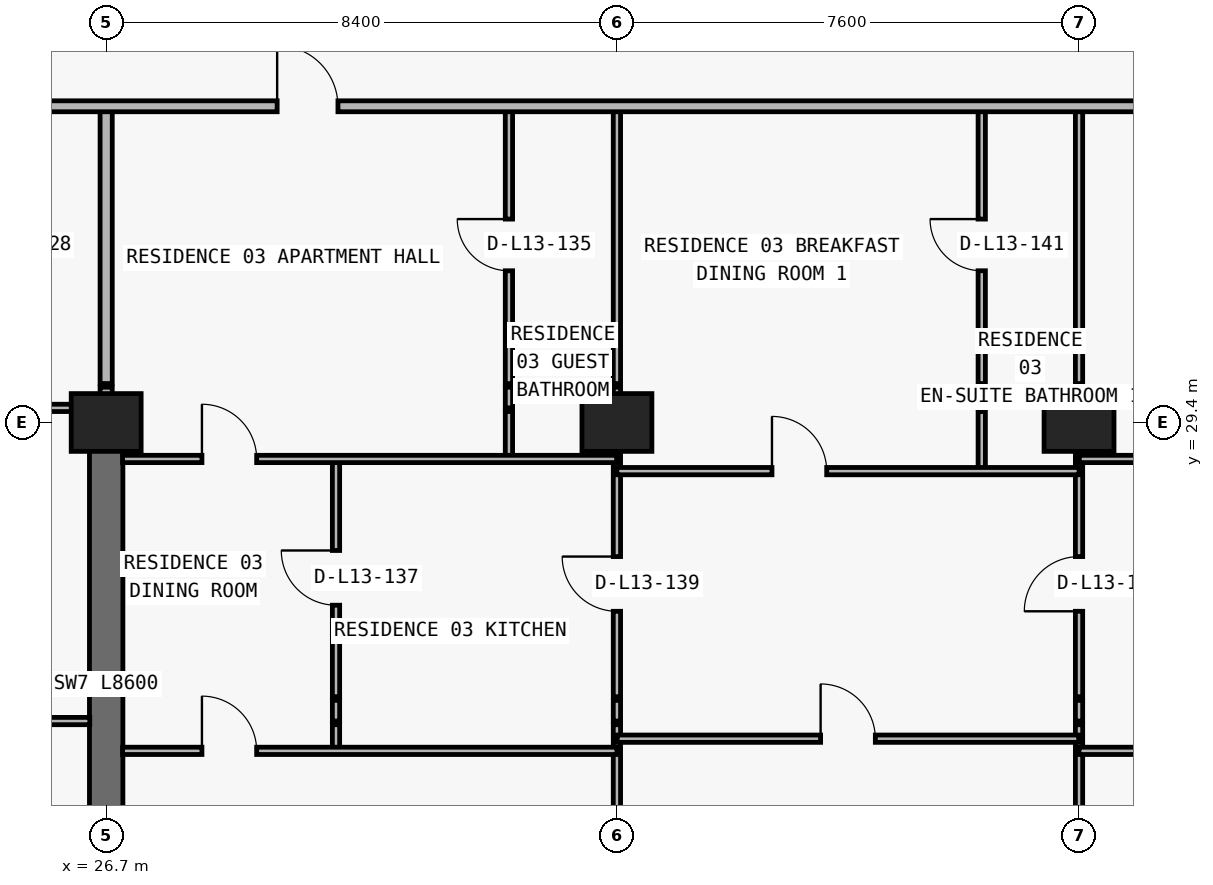
"""IFC4 building model, lengths in metres.
Left out: names, types, materials, properties, quantities, classifications, styles, units other than length and angle.
Written with IfcOpenShell. Run it as: python <this file> out.ifc"""

import sys

from ifc_helpers import new_model, si_unit, direction, frame, frame_2d, origin, origin_2d, place, context, subcontext, project, spatial, rectangle, extrude, element, fill, save


model = new_model("IFC4")
c1 = context("Model", 3, precision=1e-05, world=origin(), true_north=direction((0.0, 1.0)))
c2 = subcontext(c1, "Body", "Model", "MODEL_VIEW")
j1 = project(units=[si_unit("LENGTHUNIT", "METRE"), si_unit("PLANEANGLEUNIT", "RADIAN")], contexts=[c1])
p1 = place(None, origin())
s1 = spatial("IfcSite", under=j1, at=p1, CompositionType="ELEMENT")
p2 = place(p1, origin())
s2 = spatial("IfcBuilding", under=s1, at=p2, CompositionType="ELEMENT")
p3 = place(p2, frame((0.0, 0.0, 53.1)))
s3 = spatial("IfcBuildingStorey", under=s2, at=p3, CompositionType="ELEMENT", Elevation=53.1)
for number, where, z_axis, x_axis in (
    (1, (26.7, 29.4, 0.0), (0.0, 0.0, 1.0), (1.0, 0.0, 0.0)),
    (2, (35.1, 29.4, 0.0), (0.0, 0.0, 1.0), (1.0, 0.0, 0.0)),
    (3, (42.7, 29.4, 0.0), (0.0, 0.0, 1.0), (1.0, 0.0, 0.0)),
):
    element("IfcColumn", number, at=place(p3, frame(where, z_axis=z_axis, x_axis=x_axis)), inside=s3, PredefinedType="COLUMN", context=c2, shape_type="SweptSolid", body=[
        extrude(rectangle(XDim=1.15, YDim=0.95, at=origin_2d()), origin(), (0.0, 0.0, 1.0), 3.05),
    ])
p4 = place(p3, frame((26.7, 20.8, 0.0), z_axis=(0.0, 0.0, 1.0), x_axis=(0.0, 1.0, 0.0)))
e4 = element("IfcWall", 4, at=p4, inside=s3, PredefinedType="SHEAR", context=c2, shape_type="SweptSolid", body=[
    extrude(rectangle(XDim=8.6, YDim=0.55, at=frame_2d((4.3, 0.0))), origin(), (0.0, 0.0, 1.0), 3.05),
])
p5 = place(p3, frame((26.7, 29.64, 0.0), z_axis=(0.0, 0.0, 1.0), x_axis=(0.0, 1.0, 0.0)))
e5 = element("IfcWall", 5, at=p5, inside=s3, PredefinedType="PARTITIONING", context=c2, shape_type="SweptSolid", body=[
    extrude(rectangle(XDim=0.34, YDim=0.2, at=frame_2d((0.17, 0.0))), origin(), (0.0, 0.0, 1.0), 2.335),
])
p6 = place(p3, frame((26.7, 30.04, 0.0), z_axis=(0.0, 0.0, 1.0), x_axis=(0.0, 1.0, 0.0)))
e6 = element("IfcWall", 6, at=p6, inside=s3, PredefinedType="PARTITIONING", context=c2, shape_type="SweptSolid", body=[
    extrude(rectangle(XDim=4.56, YDim=0.2, at=frame_2d((2.28, 0.0))), origin(), (0.0, 0.0, 1.0), 2.335),
])
p7 = place(p3, frame((30.48, 24.0, 0.0), z_axis=(0.0, 0.0, 1.0), x_axis=(0.0, 1.0, 0.0)))
e7 = element("IfcWall", 7, at=p7, inside=s3, PredefinedType="PARTITIONING", context=c2, shape_type="SweptSolid", body=[
    extrude(rectangle(XDim=0.43, YDim=0.12, at=frame_2d((0.215, 0.0))), origin(), (0.0, 0.0, 1.0), 3.05),
])
p8 = place(p3, frame((30.48, 24.49, 0.0), z_axis=(0.0, 0.0, 1.0), x_axis=(0.0, 1.0, 0.0)))
e8 = element("IfcWall", 8, at=p8, inside=s3, PredefinedType="PARTITIONING", context=c2, shape_type="SweptSolid", body=[
    extrude(rectangle(XDim=0.34, YDim=0.12, at=frame_2d((0.17, 0.0))), origin(), (0.0, 0.0, 1.0), 3.05),
])
p9 = place(p3, frame((30.48, 24.89, 0.0), z_axis=(0.0, 0.0, 1.0), x_axis=(0.0, 1.0, 0.0)))
e9 = element("IfcWall", 9, at=p9, inside=s3, PredefinedType="PARTITIONING", context=c2, shape_type="SweptSolid", body=[
    extrude(rectangle(XDim=3.91, YDim=0.12, at=frame_2d((1.955, 0.0))), origin(), (0.0, 0.0, 1.0), 3.05),
])
p10 = place(p9, frame((1.505, 0.0, 0.0)))
e10 = element("IfcOpeningElement", 10, at=p10, cuts=e9, PredefinedType="OPENING", context=c2, shape_type="SweptSolid", body=[
    extrude(rectangle(XDim=0.9, YDim=2.15, at=frame_2d((0.45, 1.075))), frame((0.0, 0.07, 0.0), z_axis=(0.0, -1.0, 0.0), x_axis=(1.0, 0.0, 0.0)), (0.0, 0.0, 1.0), 0.14),
])
p11 = place(p3, frame((33.324, 28.8, 0.0), z_axis=(0.0, 0.0, 1.0), x_axis=(0.0, 1.0, 0.0)))
e11 = element("IfcWall", 11, at=p11, inside=s3, PredefinedType="PARTITIONING", context=c2, shape_type="SweptSolid", body=[
    extrude(rectangle(XDim=0.78, YDim=0.12, at=frame_2d((0.39, 0.0))), origin(), (0.0, 0.0, 1.0), 3.05),
])
p12 = place(p3, frame((33.324, 29.64, 0.0), z_axis=(0.0, 0.0, 1.0), x_axis=(0.0, 1.0, 0.0)))
e12 = element("IfcWall", 12, at=p12, inside=s3, PredefinedType="PARTITIONING", context=c2, shape_type="SweptSolid", body=[
    extrude(rectangle(XDim=0.34, YDim=0.12, at=frame_2d((0.17, 0.0))), origin(), (0.0, 0.0, 1.0), 3.05),
])
p13 = place(p3, frame((33.324, 30.04, 0.0), z_axis=(0.0, 0.0, 1.0), x_axis=(0.0, 1.0, 0.0)))
e13 = element("IfcWall", 13, at=p13, inside=s3, PredefinedType="PARTITIONING", context=c2, shape_type="SweptSolid", body=[
    extrude(rectangle(XDim=4.56, YDim=0.12, at=frame_2d((2.28, 0.0))), origin(), (0.0, 0.0, 1.0), 3.05),
])
p14 = place(p13, frame((1.855, 0.0, 0.0)))
e14 = element("IfcOpeningElement", 14, at=p14, cuts=e13, PredefinedType="OPENING", context=c2, shape_type="SweptSolid", body=[
    extrude(rectangle(XDim=0.85, YDim=2.1, at=frame_2d((0.425, 1.05))), frame((0.0, 0.07, 0.0), z_axis=(0.0, -1.0, 0.0), x_axis=(1.0, 0.0, 0.0)), (0.0, 0.0, 1.0), 0.14),
])
p15 = place(p3, frame((35.1, 6.24, 0.0), z_axis=(0.0, 0.0, 1.0), x_axis=(0.0, 1.0, 0.0)))
e15 = element("IfcWall", 15, at=p15, inside=s3, PredefinedType="PARTITIONING", context=c2, shape_type="SweptSolid", body=[
    extrude(rectangle(XDim=18.19, YDim=0.12, at=frame_2d((9.095, 0.0))), origin(), (0.0, 0.0, 1.0), 2.11),
])
p16 = place(p3, frame((35.1, 24.49, 0.0), z_axis=(0.0, 0.0, 1.0), x_axis=(0.0, 1.0, 0.0)))
e16 = element("IfcWall", 16, at=p16, inside=s3, PredefinedType="PARTITIONING", context=c2, shape_type="SweptSolid", body=[
    extrude(rectangle(XDim=0.34, YDim=0.12, at=frame_2d((0.17, 0.0))), origin(), (0.0, 0.0, 1.0), 2.11),
])
p17 = place(p3, frame((35.1, 24.89, 0.0), z_axis=(0.0, 0.0, 1.0), x_axis=(0.0, 1.0, 0.0)))
e17 = element("IfcWall", 17, at=p17, inside=s3, PredefinedType="PARTITIONING", context=c2, shape_type="SweptSolid", body=[
    extrude(rectangle(XDim=4.69, YDim=0.12, at=frame_2d((2.345, 0.0))), origin(), (0.0, 0.0, 1.0), 2.11),
])
p18 = place(p17, frame((1.405, 0.0, 0.0)))
e18 = element("IfcOpeningElement", 18, at=p18, cuts=e17, PredefinedType="OPENING", context=c2, shape_type="SweptSolid", body=[
    extrude(rectangle(XDim=0.9, YDim=2.06, at=frame_2d((0.45, 1.03))), frame((0.0, 0.07, 0.0), z_axis=(0.0, -1.0, 0.0), x_axis=(1.0, 0.0, 0.0)), (0.0, 0.0, 1.0), 0.14),
])
p19 = place(p3, frame((35.1, 29.64, 0.0), z_axis=(0.0, 0.0, 1.0), x_axis=(0.0, 1.0, 0.0)))
e19 = element("IfcWall", 19, at=p19, inside=s3, PredefinedType="PARTITIONING", context=c2, shape_type="SweptSolid", body=[
    extrude(rectangle(XDim=0.34, YDim=0.12, at=frame_2d((0.17, 0.0))), origin(), (0.0, 0.0, 1.0), 2.11),
])
p20 = place(p3, frame((35.1, 30.04, 0.0), z_axis=(0.0, 0.0, 1.0), x_axis=(0.0, 1.0, 0.0)))
e20 = element("IfcWall", 20, at=p20, inside=s3, PredefinedType="PARTITIONING", context=c2, shape_type="SweptSolid", body=[
    extrude(rectangle(XDim=4.56, YDim=0.12, at=frame_2d((2.28, 0.0))), origin(), (0.0, 0.0, 1.0), 2.11),
])
p21 = place(p3, frame((41.1, 28.6, 0.0), z_axis=(0.0, 0.0, 1.0), x_axis=(0.0, 1.0, 0.0)))
e21 = element("IfcWall", 21, at=p21, inside=s3, PredefinedType="PARTITIONING", context=c2, shape_type="SweptSolid", body=[
    extrude(rectangle(XDim=0.98, YDim=0.12, at=frame_2d((0.49, 0.0))), origin(), (0.0, 0.0, 1.0), 2.578),
])
p22 = place(p3, frame((41.1, 29.64, 0.0), z_axis=(0.0, 0.0, 1.0), x_axis=(0.0, 1.0, 0.0)))
e22 = element("IfcWall", 22, at=p22, inside=s3, PredefinedType="PARTITIONING", context=c2, shape_type="SweptSolid", body=[
    extrude(rectangle(XDim=0.34, YDim=0.12, at=frame_2d((0.17, 0.0))), origin(), (0.0, 0.0, 1.0), 3.05),
])
p23 = place(p3, frame((41.1, 30.04, 0.0), z_axis=(0.0, 0.0, 1.0), x_axis=(0.0, 1.0, 0.0)))
e23 = element("IfcWall", 23, at=p23, inside=s3, PredefinedType="PARTITIONING", context=c2, shape_type="SweptSolid", body=[
    extrude(rectangle(XDim=4.56, YDim=0.12, at=frame_2d((2.28, 0.0))), origin(), (0.0, 0.0, 1.0), 3.05),
])
p24 = place(p23, frame((1.855, 0.0, 0.0)))
e24 = element("IfcOpeningElement", 24, at=p24, cuts=e23, PredefinedType="OPENING", context=c2, shape_type="SweptSolid", body=[
    extrude(rectangle(XDim=0.85, YDim=2.1, at=frame_2d((0.425, 1.05))), frame((0.0, 0.07, 0.0), z_axis=(0.0, -1.0, 0.0), x_axis=(1.0, 0.0, 0.0)), (0.0, 0.0, 1.0), 0.14),
])
p25 = place(p3, frame((42.7, 6.24, 0.0), z_axis=(0.0, 0.0, 1.0), x_axis=(0.0, 1.0, 0.0)))
e25 = element("IfcWall", 25, at=p25, inside=s3, PredefinedType="PARTITIONING", context=c2, shape_type="SweptSolid", body=[
    extrude(rectangle(XDim=18.19, YDim=0.12, at=frame_2d((9.095, 0.0))), origin(), (0.0, 0.0, 1.0), 2.11),
])
p26 = place(p3, frame((42.7, 24.49, 0.0), z_axis=(0.0, 0.0, 1.0), x_axis=(0.0, 1.0, 0.0)))
e26 = element("IfcWall", 26, at=p26, inside=s3, PredefinedType="PARTITIONING", context=c2, shape_type="SweptSolid", body=[
    extrude(rectangle(XDim=0.34, YDim=0.12, at=frame_2d((0.17, 0.0))), origin(), (0.0, 0.0, 1.0), 2.11),
])
p27 = place(p3, frame((42.7, 24.89, 0.0), z_axis=(0.0, 0.0, 1.0), x_axis=(0.0, 1.0, 0.0)))
e27 = element("IfcWall", 27, at=p27, inside=s3, PredefinedType="PARTITIONING", context=c2, shape_type="SweptSolid", body=[
    extrude(rectangle(XDim=4.69, YDim=0.12, at=frame_2d((2.345, 0.0))), origin(), (0.0, 0.0, 1.0), 2.11),
])
p28 = place(p27, frame((1.405, 0.0, 0.0)))
e28 = element("IfcOpeningElement", 28, at=p28, cuts=e27, PredefinedType="OPENING", context=c2, shape_type="SweptSolid", body=[
    extrude(rectangle(XDim=0.9, YDim=2.06, at=frame_2d((0.45, 1.03))), frame((0.0, 0.07, 0.0), z_axis=(0.0, -1.0, 0.0), x_axis=(1.0, 0.0, 0.0)), (0.0, 0.0, 1.0), 0.14),
])
p29 = place(p3, frame((42.7, 29.64, 0.0), z_axis=(0.0, 0.0, 1.0), x_axis=(0.0, 1.0, 0.0)))
e29 = element("IfcWall", 29, at=p29, inside=s3, PredefinedType="PARTITIONING", context=c2, shape_type="SweptSolid", body=[
    extrude(rectangle(XDim=0.34, YDim=0.12, at=frame_2d((0.17, 0.0))), origin(), (0.0, 0.0, 1.0), 2.11),
])
p30 = place(p3, frame((42.7, 30.04, 0.0), z_axis=(0.0, 0.0, 1.0), x_axis=(0.0, 1.0, 0.0)))
e30 = element("IfcWall", 30, at=p30, inside=s3, PredefinedType="PARTITIONING", context=c2, shape_type="SweptSolid", body=[
    extrude(rectangle(XDim=4.56, YDim=0.12, at=frame_2d((2.28, 0.0))), origin(), (0.0, 0.0, 1.0), 2.11),
])
p31 = place(p3, frame((26.97, 24.0, 0.0), z_axis=(0.0, 0.0, 1.0), x_axis=(1.0, 0.0, 0.0)))
e31 = element("IfcWall", 31, at=p31, inside=s3, PredefinedType="PARTITIONING", context=c2, shape_type="SweptSolid", body=[
    extrude(rectangle(XDim=8.13, YDim=0.12, at=frame_2d((4.065, 0.0))), origin(), (0.0, 0.0, 1.0), 3.05),
])
p32 = place(p31, frame((1.305, 0.0, 0.0)))
e32 = element("IfcOpeningElement", 32, at=p32, cuts=e31, PredefinedType="OPENING", context=c2, shape_type="SweptSolid", body=[
    extrude(rectangle(XDim=0.9, YDim=2.15, at=frame_2d((0.45, 1.075))), frame((0.0, 0.07, 0.0), z_axis=(0.0, -1.0, 0.0), x_axis=(1.0, 0.0, 0.0)), (0.0, 0.0, 1.0), 0.14),
])
p33 = place(p3, frame((42.7, 24.0, 0.0), z_axis=(0.0, 0.0, 1.0), x_axis=(1.0, 0.0, 0.0)))
e33 = element("IfcWall", 33, at=p33, inside=s3, PredefinedType="PARTITIONING", context=c2, shape_type="SweptSolid", body=[
    extrude(rectangle(XDim=8.13, YDim=0.12, at=frame_2d((4.065, 0.0))), origin(), (0.0, 0.0, 1.0), 3.05),
])
p34 = place(p33, frame((3.615, 0.0, 0.0)))
e34 = element("IfcOpeningElement", 34, at=p34, cuts=e33, PredefinedType="OPENING", context=c2, shape_type="SweptSolid", body=[
    extrude(rectangle(XDim=0.9, YDim=2.15, at=frame_2d((0.45, 1.075))), frame((0.0, 0.07, 0.0), z_axis=(0.0, -1.0, 0.0), x_axis=(1.0, 0.0, 0.0)), (0.0, 0.0, 1.0), 0.14),
])
p35 = place(p3, frame((35.105, 24.2, 0.0), z_axis=(0.0, 0.0, 1.0), x_axis=(1.0, 0.0, 0.0)))
e35 = element("IfcWall", 35, at=p35, inside=s3, PredefinedType="PARTITIONING", context=c2, shape_type="SweptSolid", body=[
    extrude(rectangle(XDim=7.59, YDim=0.12, at=frame_2d((3.795, 0.0))), origin(), (0.0, 0.0, 1.0), 3.05),
])
p36 = place(p35, frame((3.345, 0.0, 0.0)))
e36 = element("IfcOpeningElement", 36, at=p36, cuts=e35, PredefinedType="OPENING", context=c2, shape_type="SweptSolid", body=[
    extrude(rectangle(XDim=0.9, YDim=2.15, at=frame_2d((0.45, 1.075))), frame((0.0, 0.07, 0.0), z_axis=(0.0, -1.0, 0.0), x_axis=(1.0, 0.0, 0.0)), (0.0, 0.0, 1.0), 0.14),
])
p37 = place(p3, frame((18.3, 24.49, 0.0), z_axis=(0.0, 0.0, 1.0), x_axis=(1.0, 0.0, 0.0)))
e37 = element("IfcWall", 37, at=p37, inside=s3, PredefinedType="PARTITIONING", context=c2, shape_type="SweptSolid", body=[
    extrude(rectangle(XDim=8.13, YDim=0.12, at=frame_2d((4.065, 0.0))), origin(), (0.0, 0.0, 1.0), 3.05),
])
p38 = place(p37, frame((1.818, 0.0, 0.0)))
e38 = element("IfcOpeningElement", 38, at=p38, cuts=e37, PredefinedType="OPENING", context=c2, shape_type="SweptSolid", body=[
    extrude(rectangle(XDim=0.9, YDim=2.15, at=frame_2d((0.45, 1.075))), frame((0.0, 0.07, 0.0), z_axis=(0.0, -1.0, 0.0), x_axis=(1.0, 0.0, 0.0)), (0.0, 0.0, 1.0), 0.14),
])
p39 = place(p37, frame((5.925, 0.0, 0.0)))
e39 = element("IfcOpeningElement", 39, at=p39, cuts=e37, PredefinedType="OPENING", context=c2, shape_type="SweptSolid", body=[
    extrude(rectangle(XDim=0.9, YDim=2.15, at=frame_2d((0.45, 1.075))), frame((0.0, 0.07, 0.0), z_axis=(0.0, -1.0, 0.0), x_axis=(1.0, 0.0, 0.0)), (0.0, 0.0, 1.0), 0.14),
])
p40 = place(p3, frame((35.1, 28.6, 0.0), z_axis=(0.0, 0.0, 1.0), x_axis=(1.0, 0.0, 0.0)))
e40 = element("IfcWall", 40, at=p40, inside=s3, PredefinedType="PARTITIONING", context=c2, shape_type="SweptSolid", body=[
    extrude(rectangle(XDim=7.6, YDim=0.12, at=frame_2d((3.8, 0.0))), origin(), (0.0, 0.0, 1.0), 3.05),
])
p41 = place(p40, frame((2.55, 0.0, 0.0)))
e41 = element("IfcOpeningElement", 41, at=p41, cuts=e40, PredefinedType="OPENING", context=c2, shape_type="SweptSolid", body=[
    extrude(rectangle(XDim=0.9, YDim=2.15, at=frame_2d((0.45, 1.075))), frame((0.0, 0.07, 0.0), z_axis=(0.0, -1.0, 0.0), x_axis=(1.0, 0.0, 0.0)), (0.0, 0.0, 1.0), 0.14),
])
p42 = place(p3, frame((26.97, 28.8, 0.0), z_axis=(0.0, 0.0, 1.0), x_axis=(1.0, 0.0, 0.0)))
e42 = element("IfcWall", 42, at=p42, inside=s3, PredefinedType="PARTITIONING", context=c2, shape_type="SweptSolid", body=[
    extrude(rectangle(XDim=8.125, YDim=0.12, at=frame_2d((4.062, 0.0))), origin(), (0.0, 0.0, 1.0), 3.05),
])
p43 = place(p42, frame((1.305, 0.0, 0.0)))
e43 = element("IfcOpeningElement", 43, at=p43, cuts=e42, PredefinedType="OPENING", context=c2, shape_type="SweptSolid", body=[
    extrude(rectangle(XDim=0.9, YDim=2.15, at=frame_2d((0.45, 1.075))), frame((0.0, 0.07, 0.0), z_axis=(0.0, -1.0, 0.0), x_axis=(1.0, 0.0, 0.0)), (0.0, 0.0, 1.0), 0.14),
])
p44 = place(p3, frame((42.705, 28.8, 0.0), z_axis=(0.0, 0.0, 1.0), x_axis=(1.0, 0.0, 0.0)))
e44 = element("IfcWall", 44, at=p44, inside=s3, PredefinedType="PARTITIONING", context=c2, shape_type="SweptSolid", body=[
    extrude(rectangle(XDim=8.125, YDim=0.12, at=frame_2d((4.062, 0.0))), origin(), (0.0, 0.0, 1.0), 3.05),
])
p45 = place(p44, frame((2.877, 0.0, 0.0)))
e45 = element("IfcOpeningElement", 45, at=p45, cuts=e44, PredefinedType="OPENING", context=c2, shape_type="SweptSolid", body=[
    extrude(rectangle(XDim=0.9, YDim=2.15, at=frame_2d((0.45, 1.075))), frame((0.0, 0.07, 0.0), z_axis=(0.0, -1.0, 0.0), x_axis=(1.0, 0.0, 0.0)), (0.0, 0.0, 1.0), 0.14),
])
p46 = place(p3, frame((18.3, 29.64, 0.0), z_axis=(0.0, 0.0, 1.0), x_axis=(1.0, 0.0, 0.0)))
e46 = element("IfcWall", 46, at=p46, inside=s3, PredefinedType="PARTITIONING", context=c2, shape_type="SweptSolid", body=[
    extrude(rectangle(XDim=8.4, YDim=0.12, at=frame_2d((4.2, 0.0))), origin(), (0.0, 0.0, 1.0), 2.11),
])
p47 = place(p46, frame((1.818, 0.0, 0.0)))
e47 = element("IfcOpeningElement", 47, at=p47, cuts=e46, PredefinedType="OPENING", context=c2, shape_type="SweptSolid", body=[
    extrude(rectangle(XDim=0.9, YDim=2.06, at=frame_2d((0.45, 1.03))), frame((0.0, 0.07, 0.0), z_axis=(0.0, -1.0, 0.0), x_axis=(1.0, 0.0, 0.0)), (0.0, 0.0, 1.0), 0.14),
])
p48 = place(p3, frame((5.105, 34.6, 0.0), z_axis=(0.0, 0.0, 1.0), x_axis=(1.0, 0.0, 0.0)))
e48 = element("IfcWall", 48, at=p48, inside=s3, PredefinedType="PARTITIONING", context=c2, shape_type="SweptSolid", body=[
    extrude(rectangle(XDim=67.595, YDim=0.18, at=frame_2d((33.797, 0.0))), origin(), (0.0, 0.0, 1.0), 3.05),
])
p49 = place(p48, frame((7.365, 0.0, 0.0)))
e49 = element("IfcOpeningElement", 49, at=p49, cuts=e48, PredefinedType="OPENING", context=c2, shape_type="SweptSolid", body=[
    extrude(rectangle(XDim=1.0, YDim=2.2, at=frame_2d((0.5, 1.1))), frame((0.0, 0.1, 0.0), z_axis=(0.0, -1.0, 0.0), x_axis=(1.0, 0.0, 0.0)), (0.0, 0.0, 1.0), 0.2),
])
p50 = place(p48, frame((15.927, 0.0, 0.0)))
e50 = element("IfcOpeningElement", 50, at=p50, cuts=e48, PredefinedType="OPENING", context=c2, shape_type="SweptSolid", body=[
    extrude(rectangle(XDim=1.0, YDim=2.2, at=frame_2d((0.5, 1.1))), frame((0.0, 0.1, 0.0), z_axis=(0.0, -1.0, 0.0), x_axis=(1.0, 0.0, 0.0)), (0.0, 0.0, 1.0), 0.2),
])
p51 = place(p48, frame((24.407, 0.0, 0.0)))
e51 = element("IfcOpeningElement", 51, at=p51, cuts=e48, PredefinedType="OPENING", context=c2, shape_type="SweptSolid", body=[
    extrude(rectangle(XDim=1.0, YDim=2.2, at=frame_2d((0.5, 1.1))), frame((0.0, 0.1, 0.0), z_axis=(0.0, -1.0, 0.0), x_axis=(1.0, 0.0, 0.0)), (0.0, 0.0, 1.0), 0.2),
])
p52 = place(p48, frame((48.739, 0.0, 0.0)))
e52 = element("IfcOpeningElement", 52, at=p52, cuts=e48, PredefinedType="OPENING", context=c2, shape_type="SweptSolid", body=[
    extrude(rectangle(XDim=1.0, YDim=2.2, at=frame_2d((0.5, 1.1))), frame((0.0, 0.1, 0.0), z_axis=(0.0, -1.0, 0.0), x_axis=(1.0, 0.0, 0.0)), (0.0, 0.0, 1.0), 0.2),
])
p53 = place(p48, frame((56.98, 0.0, 0.0)))
e53 = element("IfcOpeningElement", 53, at=p53, cuts=e48, PredefinedType="OPENING", context=c2, shape_type="SweptSolid", body=[
    extrude(rectangle(XDim=1.0, YDim=2.2, at=frame_2d((0.5, 1.1))), frame((0.0, 0.1, 0.0), z_axis=(0.0, -1.0, 0.0), x_axis=(1.0, 0.0, 0.0)), (0.0, 0.0, 1.0), 0.2),
])
p54 = place(p51, origin())
e54 = element("IfcDoor", 54, at=p54, inside=s3, OperationType="SINGLE_SWING_LEFT", PredefinedType="DOOR", context=c2, shape_type="SweptSolid", body=[
    extrude(rectangle(XDim=1.0, YDim=2.2, at=frame_2d((0.5, 1.1))), frame((0.0, 0.025, 0.0), z_axis=(0.0, -1.0, 0.0), x_axis=(1.0, 0.0, 0.0)), (0.0, 0.0, 1.0), 0.05),
])
fill(e51, e54)
p55 = place(p14, origin())
e55 = element("IfcDoor", 55, at=p55, inside=s3, OperationType="SINGLE_SWING_RIGHT", PredefinedType="DOOR", context=c2, shape_type="SweptSolid", body=[
    extrude(rectangle(XDim=0.85, YDim=2.1, at=frame_2d((0.425, 1.05))), frame((0.0, 0.025, 0.0), z_axis=(0.0, -1.0, 0.0), x_axis=(1.0, 0.0, 0.0)), (0.0, 0.0, 1.0), 0.05),
])
fill(e14, e55)
p56 = place(p43, origin())
e56 = element("IfcDoor", 56, at=p56, inside=s3, OperationType="SINGLE_SWING_LEFT", PredefinedType="DOOR", context=c2, shape_type="SweptSolid", body=[
    extrude(rectangle(XDim=0.9, YDim=2.15, at=frame_2d((0.45, 1.075))), frame((0.0, 0.025, 0.0), z_axis=(0.0, -1.0, 0.0), x_axis=(1.0, 0.0, 0.0)), (0.0, 0.0, 1.0), 0.05),
])
fill(e43, e56)
p57 = place(p10, origin())
e57 = element("IfcDoor", 57, at=p57, inside=s3, OperationType="SINGLE_SWING_RIGHT", PredefinedType="DOOR", context=c2, shape_type="SweptSolid", body=[
    extrude(rectangle(XDim=0.9, YDim=2.15, at=frame_2d((0.45, 1.075))), frame((0.0, 0.025, 0.0), z_axis=(0.0, -1.0, 0.0), x_axis=(1.0, 0.0, 0.0)), (0.0, 0.0, 1.0), 0.05),
])
fill(e10, e57)
p58 = place(p32, origin())
e58 = element("IfcDoor", 58, at=p58, inside=s3, OperationType="SINGLE_SWING_LEFT", PredefinedType="DOOR", context=c2, shape_type="SweptSolid", body=[
    extrude(rectangle(XDim=0.9, YDim=2.15, at=frame_2d((0.45, 1.075))), frame((0.0, 0.025, 0.0), z_axis=(0.0, -1.0, 0.0), x_axis=(1.0, 0.0, 0.0)), (0.0, 0.0, 1.0), 0.05),
])
fill(e32, e58)
p59 = place(p18, origin())
e59 = element("IfcDoor", 59, at=p59, inside=s3, OperationType="SINGLE_SWING_RIGHT", PredefinedType="DOOR", context=c2, shape_type="SweptSolid", body=[
    extrude(rectangle(XDim=0.9, YDim=2.06, at=frame_2d((0.45, 1.03))), frame((0.0, 0.025, 0.0), z_axis=(0.0, -1.0, 0.0), x_axis=(1.0, 0.0, 0.0)), (0.0, 0.0, 1.0), 0.05),
])
fill(e18, e59)
p60 = place(p41, origin())
e60 = element("IfcDoor", 60, at=p60, inside=s3, OperationType="SINGLE_SWING_LEFT", PredefinedType="DOOR", context=c2, shape_type="SweptSolid", body=[
    extrude(rectangle(XDim=0.9, YDim=2.15, at=frame_2d((0.45, 1.075))), frame((0.0, 0.025, 0.0), z_axis=(0.0, -1.0, 0.0), x_axis=(1.0, 0.0, 0.0)), (0.0, 0.0, 1.0), 0.05),
])
fill(e41, e60)
p61 = place(p24, origin())
e61 = element("IfcDoor", 61, at=p61, inside=s3, OperationType="SINGLE_SWING_RIGHT", PredefinedType="DOOR", context=c2, shape_type="SweptSolid", body=[
    extrude(rectangle(XDim=0.85, YDim=2.1, at=frame_2d((0.425, 1.05))), frame((0.0, 0.025, 0.0), z_axis=(0.0, -1.0, 0.0), x_axis=(1.0, 0.0, 0.0)), (0.0, 0.0, 1.0), 0.05),
])
fill(e24, e61)
p62 = place(p36, origin())
e62 = element("IfcDoor", 62, at=p62, inside=s3, OperationType="SINGLE_SWING_LEFT", PredefinedType="DOOR", context=c2, shape_type="SweptSolid", body=[
    extrude(rectangle(XDim=0.9, YDim=2.15, at=frame_2d((0.45, 1.075))), frame((0.0, 0.025, 0.0), z_axis=(0.0, -1.0, 0.0), x_axis=(1.0, 0.0, 0.0)), (0.0, 0.0, 1.0), 0.05),
])
fill(e36, e62)
p63 = place(p28, origin())
e63 = element("IfcDoor", 63, at=p63, inside=s3, OperationType="SINGLE_SWING_LEFT", PredefinedType="DOOR", context=c2, shape_type="SweptSolid", body=[
    extrude(rectangle(XDim=0.9, YDim=2.06, at=frame_2d((0.45, 1.03))), frame((0.0, 0.025, 0.0), z_axis=(0.0, -1.0, 0.0), x_axis=(1.0, 0.0, 0.0)), (0.0, 0.0, 1.0), 0.05),
])
fill(e28, e63)
save(model, sys.argv[1])
